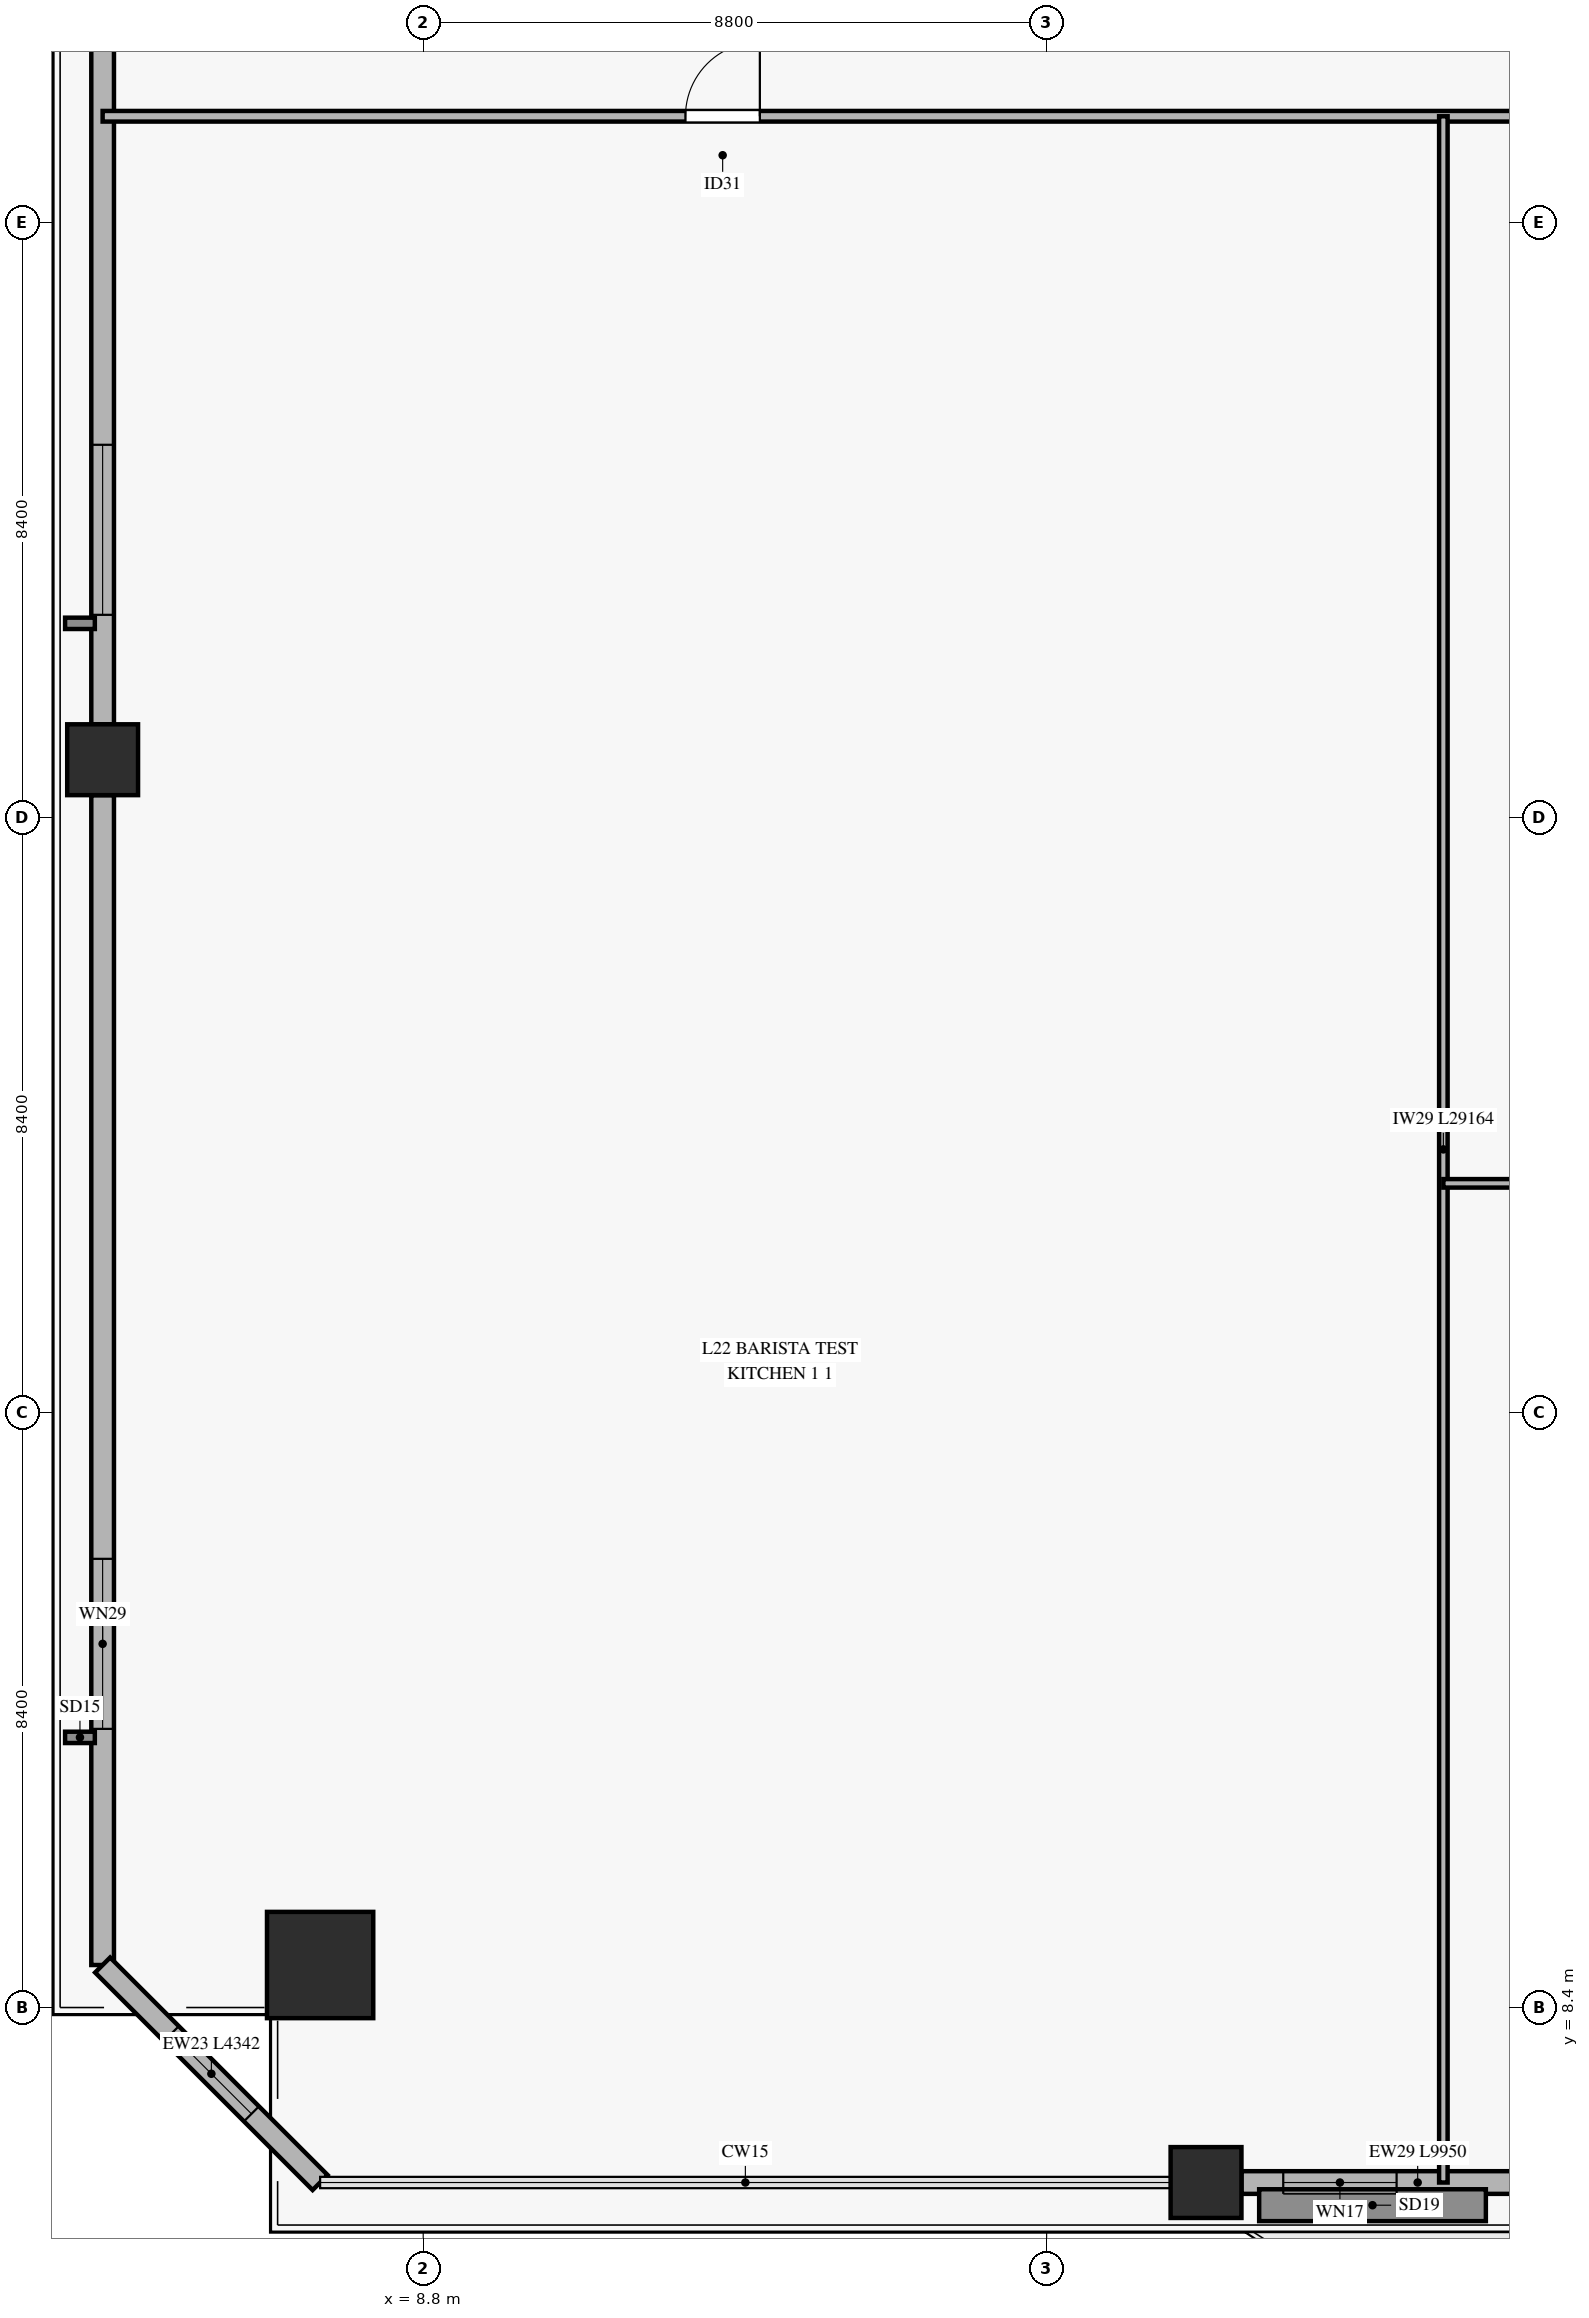
"""IFC4 building model, lengths in metres.
Left out: names, types, materials, properties, quantities, classifications, styles, units other than length and angle.
Written with IfcOpenShell. Run it as: python <this file> out.ifc"""

import sys

from ifc_helpers import new_model, si_unit, direction, frame, frame_2d, origin, origin_2d, place, context, subcontext, project, spatial, rectangle, hollow_rectangle, extrude, source, transform, mapped, element, fill, save


model = new_model("IFC4")
c1 = context("Model", 3, precision=1e-05, world=origin(), true_north=direction((0.0, 1.0)))
c2 = subcontext(c1, "Body", "Model", "MODEL_VIEW")
j1 = project(units=[si_unit("LENGTHUNIT", "METRE"), si_unit("PLANEANGLEUNIT", "RADIAN")], contexts=[c1])
p1 = place(None, origin())
s1 = spatial("IfcSite", under=j1, at=p1, CompositionType="ELEMENT")
p2 = place(p1, origin())
s2 = spatial("IfcBuilding", under=s1, at=p2, CompositionType="ELEMENT")
p3 = place(p2, frame((0.0, 0.0, 91.3)))
s3 = spatial("IfcBuildingStorey", under=s2, at=p3, CompositionType="ELEMENT", Elevation=91.3)
m1 = source(origin(), c2, "Body", "SweptSolid", [
    extrude(hollow_rectangle(XDim=1.5, YDim=1.5, WallThickness=0.07, at=origin_2d()), origin(), (0.0, 0.0, 1.0), 3.62),
])
p4 = place(p3, frame((7.345, 9.006, 0.0), z_axis=(0.0, 0.0, 1.0), x_axis=(1.0, 0.0, 0.0)))
e1 = element("IfcColumn", 1, at=p4, inside=s3, PredefinedType="COLUMN", context=c2, shape_type="MappedRepresentation", body=[
    mapped(m1, transform((0.0, 0.0, 0.0), x_axis=(1.0, 0.0, 0.0), y_axis=(0.0, 1.0, 0.0), z_axis=(0.0, 0.0, 1.0), scale=1.0)),
])
m2 = source(origin(), c2, "Body", "SweptSolid", [
    extrude(hollow_rectangle(XDim=1.0, YDim=1.0, WallThickness=0.045, at=origin_2d()), origin(), (0.0, 0.0, 1.0), 3.62),
])
for number, where, z_axis, x_axis in (
    (2, (19.85, 5.936, 0.0), (0.0, 0.0, 1.0), (1.0, 0.0, 0.0)),
    (3, (4.275, 26.018, 0.0), (0.0, 0.0, 1.0), (1.0, 0.0, 0.0)),
):
    element("IfcColumn", number, at=place(p3, frame(where, z_axis=z_axis, x_axis=x_axis)), inside=s3, PredefinedType="COLUMN", context=c2, shape_type="MappedRepresentation", body=[
        mapped(m2, transform((0.0, 0.0, 0.0), x_axis=(1.0, 0.0, 0.0), y_axis=(0.0, 1.0, 0.0), z_axis=(0.0, 0.0, 1.0), scale=1.0)),
    ])
p5 = place(p3, frame((20.35, 5.936, 0.0), z_axis=(0.0, 0.0, 1.0), x_axis=(1.0, 0.0, 0.0)))
e4 = element("IfcWall", 4, at=p5, inside=s3, PredefinedType="SOLIDWALL", context=c2, shape_type="SweptSolid", body=[
    extrude(rectangle(XDim=9.95, YDim=0.32, at=frame_2d((4.975, 0.0))), origin(), (0.0, 0.0, 1.0), 3.1),
])
p6 = place(p5, frame((4.05, 0.0, 0.0)))
e5 = element("IfcOpeningElement", 5, at=p6, cuts=e4, PredefinedType="OPENING", context=c2, shape_type="SweptSolid", body=[
    extrude(rectangle(XDim=1.8, YDim=2.25, at=frame_2d((0.9, 1.125))), frame((0.0, 0.17, 0.0), z_axis=(0.0, -1.0, 0.0), x_axis=(1.0, 0.0, 0.0)), (0.0, 0.0, 1.0), 0.34),
])
p7 = place(p5, frame((0.59, 0.0, 0.45)))
e6 = element("IfcOpeningElement", 6, at=p7, cuts=e4, PredefinedType="OPENING", context=c2, shape_type="SweptSolid", body=[
    extrude(rectangle(XDim=1.6, YDim=2.0, at=frame_2d((0.8, 1.0))), frame((0.0, 0.17, 0.0), z_axis=(0.0, -1.0, 0.0), x_axis=(1.0, 0.0, 0.0)), (0.0, 0.0, 1.0), 0.34),
])
p8 = place(p5, frame((7.35, 0.0, 0.45)))
e7 = element("IfcOpeningElement", 7, at=p8, cuts=e4, PredefinedType="OPENING", context=c2, shape_type="SweptSolid", body=[
    extrude(rectangle(XDim=1.6, YDim=2.0, at=frame_2d((0.8, 1.0))), frame((0.0, 0.17, 0.0), z_axis=(0.0, -1.0, 0.0), x_axis=(1.0, 0.0, 0.0)), (0.0, 0.0, 1.0), 0.34),
])
p9 = place(p3, frame((4.275, 9.006, 0.0), z_axis=(0.0, 0.0, 1.0), x_axis=(0.0, 1.0, 0.0)))
e8 = element("IfcWall", 8, at=p9, inside=s3, PredefinedType="SOLIDWALL", context=c2, shape_type="SweptSolid", body=[
    extrude(rectangle(XDim=16.512, YDim=0.32, at=frame_2d((8.256, 0.0))), origin(), (0.0, 0.0, 1.0), 3.1),
])
p10 = place(p9, frame((3.333, 0.0, 0.45)))
e9 = element("IfcOpeningElement", 9, at=p10, cuts=e8, PredefinedType="OPENING", context=c2, shape_type="SweptSolid", body=[
    extrude(rectangle(XDim=2.4, YDim=2.1, at=frame_2d((1.2, 1.05))), frame((0.0, 0.17, 0.0), z_axis=(0.0, -1.0, 0.0), x_axis=(1.0, 0.0, 0.0)), (0.0, 0.0, 1.0), 0.34),
])
p11 = place(p3, frame((4.275, 26.518, 0.0), z_axis=(0.0, 0.0, 1.0), x_axis=(0.0, 1.0, 0.0)))
e10 = element("IfcWall", 10, at=p11, inside=s3, PredefinedType="SOLIDWALL", context=c2, shape_type="SweptSolid", body=[
    extrude(rectangle(XDim=16.512, YDim=0.32, at=frame_2d((8.256, 0.0))), origin(), (0.0, 0.0, 1.0), 3.1),
])
p12 = place(p11, frame((1.545, 0.0, 0.45)))
e11 = element("IfcOpeningElement", 11, at=p12, cuts=e10, PredefinedType="OPENING", context=c2, shape_type="SweptSolid", body=[
    extrude(rectangle(XDim=2.4, YDim=2.1, at=frame_2d((1.2, 1.05))), frame((0.0, 0.17, 0.0), z_axis=(0.0, -1.0, 0.0), x_axis=(1.0, 0.0, 0.0)), (0.0, 0.0, 1.0), 0.34),
])
p13 = place(p11, frame((12.856, 0.0, 0.45)))
e12 = element("IfcOpeningElement", 12, at=p13, cuts=e10, PredefinedType="OPENING", context=c2, shape_type="SweptSolid", body=[
    extrude(rectangle(XDim=2.4, YDim=2.1, at=frame_2d((1.2, 1.05))), frame((0.0, 0.17, 0.0), z_axis=(0.0, -1.0, 0.0), x_axis=(1.0, 0.0, 0.0)), (0.0, 0.0, 1.0), 0.34),
])
p14 = place(p3, frame((4.275, 9.006, 0.0), z_axis=(0.0, 0.0, 1.0), x_axis=(0.707106781187, -0.707106781187, 0.0)))
e13 = element("IfcWall", 13, at=p14, inside=s3, PredefinedType="SOLIDWALL", context=c2, shape_type="SweptSolid", body=[
    extrude(rectangle(XDim=4.342, YDim=0.3, at=frame_2d((2.171, 0.0))), origin(), (0.0, 0.0, 1.0), 3.1),
])
p15 = place(p14, frame((1.371, 0.0, 0.45)))
e14 = element("IfcOpeningElement", 14, at=p15, cuts=e13, PredefinedType="OPENING", context=c2, shape_type="SweptSolid", body=[
    extrude(rectangle(XDim=1.6, YDim=2.0, at=frame_2d((0.8, 1.0))), frame((0.0, 0.16, 0.0), z_axis=(0.0, -1.0, 0.0), x_axis=(1.0, 0.0, 0.0)), (0.0, 0.0, 1.0), 0.32),
])
p16 = place(p3, frame((4.275, 35.1, 0.0), z_axis=(0.0, 0.0, 1.0), x_axis=(1.0, 0.0, 0.0)))
e15 = element("IfcWall", 15, at=p16, inside=s3, PredefinedType="PARTITIONING", context=c2, shape_type="SweptSolid", body=[
    extrude(rectangle(XDim=61.851, YDim=0.15, at=frame_2d((30.926, 0.0))), origin(), (0.0, 0.0, 1.0), 2.705),
])
p17 = place(p16, frame((8.227, 0.0, 0.0)))
e16 = element("IfcOpeningElement", 16, at=p17, cuts=e15, PredefinedType="OPENING", context=c2, shape_type="SweptSolid", body=[
    extrude(rectangle(XDim=1.05, YDim=2.15, at=frame_2d((0.525, 1.075))), frame((0.0, 0.085, 0.0), z_axis=(0.0, -1.0, 0.0), x_axis=(1.0, 0.0, 0.0)), (0.0, 0.0, 1.0), 0.17),
])
p18 = place(p16, frame((21.731, 0.0, 0.0)))
e17 = element("IfcOpeningElement", 17, at=p18, cuts=e15, PredefinedType="OPENING", context=c2, shape_type="SweptSolid", body=[
    extrude(rectangle(XDim=1.05, YDim=2.15, at=frame_2d((0.525, 1.075))), frame((0.0, 0.085, 0.0), z_axis=(0.0, -1.0, 0.0), x_axis=(1.0, 0.0, 0.0)), (0.0, 0.0, 1.0), 0.17),
])
p19 = place(p16, frame((28.411, 0.0, 0.0)))
e18 = element("IfcOpeningElement", 18, at=p19, cuts=e15, PredefinedType="OPENING", context=c2, shape_type="SweptSolid", body=[
    extrude(rectangle(XDim=1.05, YDim=2.15, at=frame_2d((0.525, 1.075))), frame((0.0, 0.085, 0.0), z_axis=(0.0, -1.0, 0.0), x_axis=(1.0, 0.0, 0.0)), (0.0, 0.0, 1.0), 0.17),
])
p20 = place(p16, frame((35.371, 0.0, 0.0)))
e19 = element("IfcOpeningElement", 19, at=p20, cuts=e15, PredefinedType="OPENING", context=c2, shape_type="SweptSolid", body=[
    extrude(rectangle(XDim=1.05, YDim=2.15, at=frame_2d((0.525, 1.075))), frame((0.0, 0.085, 0.0), z_axis=(0.0, -1.0, 0.0), x_axis=(1.0, 0.0, 0.0)), (0.0, 0.0, 1.0), 0.17),
])
p21 = place(p16, frame((48.981, 0.0, 0.0)))
e20 = element("IfcOpeningElement", 20, at=p21, cuts=e15, PredefinedType="OPENING", context=c2, shape_type="SweptSolid", body=[
    extrude(rectangle(XDim=1.05, YDim=2.15, at=frame_2d((0.525, 1.075))), frame((0.0, 0.085, 0.0), z_axis=(0.0, -1.0, 0.0), x_axis=(1.0, 0.0, 0.0)), (0.0, 0.0, 1.0), 0.17),
])
p22 = place(p3, frame((23.2, 5.936, 0.0), z_axis=(0.0, 0.0, 1.0), x_axis=(0.0, 1.0, 0.0)))
e21 = element("IfcWall", 21, at=p22, inside=s3, PredefinedType="PARTITIONING", context=c2, shape_type="SweptSolid", body=[
    extrude(rectangle(XDim=29.164, YDim=0.12, at=frame_2d((14.582, 0.0))), origin(), (0.0, 0.0, 1.0), 3.105),
])
p23 = place(p3, frame((23.2, 20.039, 0.0), z_axis=(0.0, 0.0, 1.0), x_axis=(1.0, 0.0, 0.0)))
e22 = element("IfcWall", 22, at=p23, inside=s3, PredefinedType="PARTITIONING", context=c2, shape_type="SweptSolid", body=[
    extrude(rectangle(XDim=6.6, YDim=0.12, at=frame_2d((3.3, 0.0))), origin(), (0.0, 0.0, 1.0), 3.62),
])
p24 = place(p23, frame((2.935, 0.0, 0.0)))
e23 = element("IfcOpeningElement", 23, at=p24, cuts=e22, PredefinedType="OPENING", context=c2, shape_type="SweptSolid", body=[
    extrude(rectangle(XDim=0.95, YDim=2.1, at=frame_2d((0.475, 1.05))), frame((0.0, 0.07, 0.0), z_axis=(0.0, -1.0, 0.0), x_axis=(1.0, 0.0, 0.0)), (0.0, 0.0, 1.0), 0.14),
])
m3 = source(origin(), c2, "Body", "SweptSolid", [
    extrude(rectangle(XDim=1.6, YDim=2.0, at=frame_2d((0.8, 1.0))), frame((0.0, 0.03, 0.0), z_axis=(0.0, -1.0, 0.0), x_axis=(1.0, 0.0, 0.0)), (0.0, 0.0, 1.0), 0.06),
])
p25 = place(p7, origin())
e24 = element("IfcWindow", 24, at=p25, inside=s3, PartitioningType="SINGLE_PANEL", PredefinedType="WINDOW", context=c2, shape_type="MappedRepresentation", body=[
    mapped(m3, transform((0.0, 0.0, 0.0), x_axis=(1.0, 0.0, 0.0), y_axis=(0.0, 1.0, 0.0), z_axis=(0.0, 0.0, 1.0), scale=1.0)),
])
fill(e6, e24)
m4 = source(origin(), c2, "Body", "SweptSolid", [
    extrude(rectangle(XDim=2.4, YDim=2.1, at=frame_2d((1.2, 1.05))), frame((0.0, 0.03, 0.0), z_axis=(0.0, -1.0, 0.0), x_axis=(1.0, 0.0, 0.0)), (0.0, 0.0, 1.0), 0.06),
])
p26 = place(p10, origin())
e25 = element("IfcWindow", 25, at=p26, inside=s3, PartitioningType="SINGLE_PANEL", PredefinedType="WINDOW", context=c2, shape_type="MappedRepresentation", body=[
    mapped(m4, transform((0.0, 0.0, 0.0), x_axis=(1.0, 0.0, 0.0), y_axis=(0.0, 1.0, 0.0), z_axis=(0.0, 0.0, 1.0), scale=1.0)),
])
fill(e9, e25)
p27 = place(p12, origin())
e26 = element("IfcWindow", 26, at=p27, inside=s3, PartitioningType="SINGLE_PANEL", PredefinedType="WINDOW", context=c2, shape_type="MappedRepresentation", body=[
    mapped(m4, transform((0.0, 0.0, 0.0), x_axis=(1.0, 0.0, 0.0), y_axis=(0.0, 1.0, 0.0), z_axis=(0.0, 0.0, 1.0), scale=1.0)),
])
fill(e11, e26)
p28 = place(p15, origin())
e27 = element("IfcWindow", 27, at=p28, inside=s3, PartitioningType="SINGLE_PANEL", PredefinedType="WINDOW", context=c2, shape_type="MappedRepresentation", body=[
    mapped(m3, transform((0.0, 0.0, 0.0), x_axis=(1.0, 0.0, 0.0), y_axis=(0.0, 1.0, 0.0), z_axis=(0.0, 0.0, 1.0), scale=1.0)),
])
fill(e14, e27)
m5 = source(origin(), c2, "Body", "SweptSolid", [
    extrude(rectangle(XDim=1.05, YDim=2.15, at=frame_2d((0.525, 1.075))), frame((0.0, 0.025, 0.0), z_axis=(0.0, -1.0, 0.0), x_axis=(1.0, 0.0, 0.0)), (0.0, 0.0, 1.0), 0.05),
])
p29 = place(p17, origin())
e28 = element("IfcDoor", 28, at=p29, inside=s3, OperationType="SINGLE_SWING_RIGHT", PredefinedType="DOOR", context=c2, shape_type="MappedRepresentation", body=[
    mapped(m5, transform((0.0, 0.0, 0.0), x_axis=(1.0, 0.0, 0.0), y_axis=(0.0, 1.0, 0.0), z_axis=(0.0, 0.0, 1.0), scale=1.0)),
])
fill(e16, e28)
save(model, sys.argv[1])
